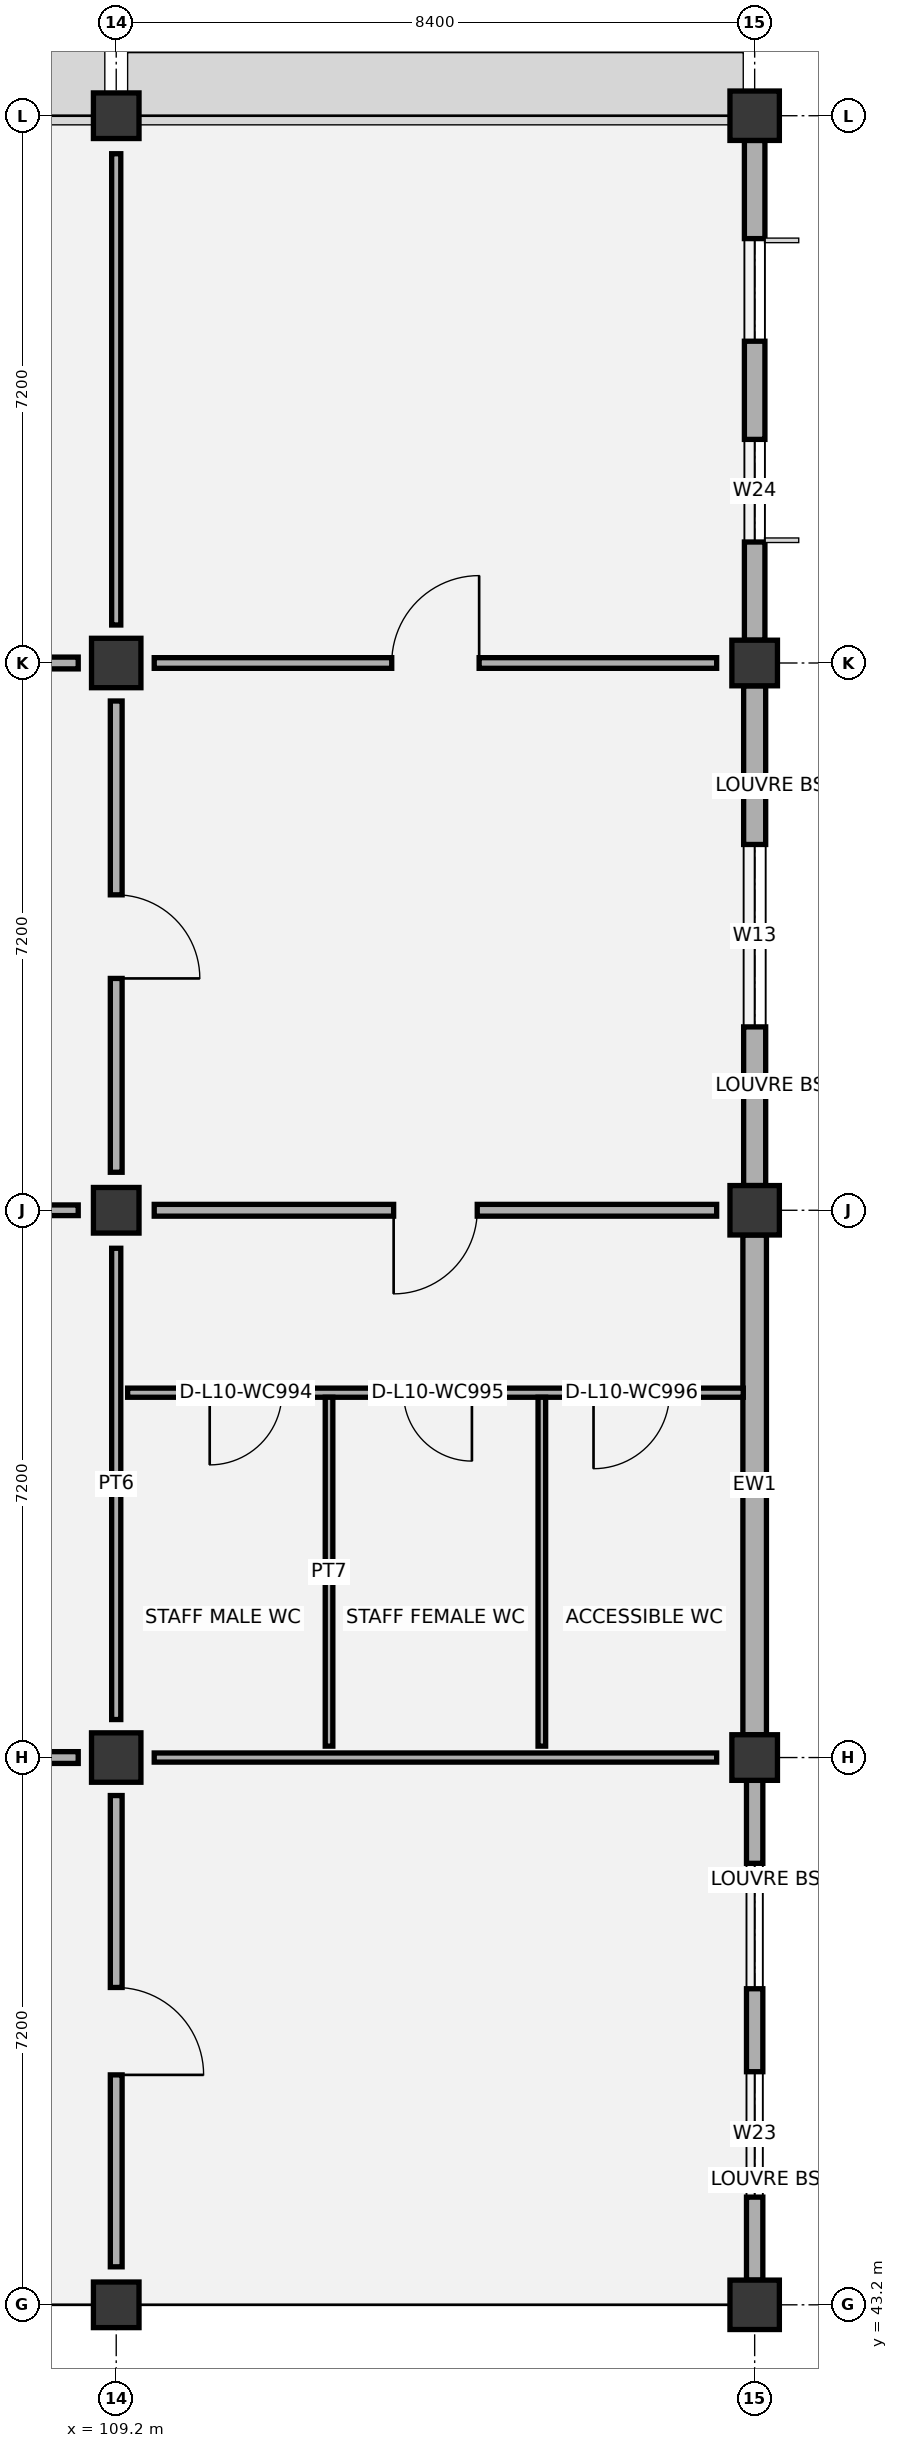
"""IFC4 building model, lengths in metres.
Left out: names, types, materials, properties, quantities, classifications, styles, units other than length and angle.
Written with IfcOpenShell. Run it as: python <this file> out.ifc"""

import sys

from ifc_helpers import new_model, si_unit, direction, frame, frame_2d, origin, origin_2d, place, context, subcontext, project, spatial, rectangle, extrude, element, fill, save


model = new_model("IFC4")
c1 = context("Model", 3, precision=1e-05, world=origin(), true_north=direction((0.0, 1.0)))
c2 = subcontext(c1, "Body", "Model", "MODEL_VIEW")
j1 = project(units=[si_unit("LENGTHUNIT", "METRE"), si_unit("PLANEANGLEUNIT", "RADIAN")], contexts=[c1])
p1 = place(None, origin())
s1 = spatial("IfcSite", under=j1, at=p1, CompositionType="ELEMENT")
p2 = place(p1, origin())
s2 = spatial("IfcBuilding", under=s1, at=p2, CompositionType="ELEMENT")
p3 = place(p2, frame((0.0, 0.0, 48.0)))
s3 = spatial("IfcBuildingStorey", under=s2, at=p3, CompositionType="ELEMENT", Elevation=48.0)
p4 = place(p3, frame((109.2, 43.2, 0.0), z_axis=(0.0, 0.0, 1.0), x_axis=(1.0, 0.0, 0.0)))
e1 = element("IfcColumn", 1, at=p4, inside=s3, PredefinedType="COLUMN", context=c2, shape_type="SweptSolid", body=[
    extrude(rectangle(XDim=0.6, YDim=0.6, at=origin_2d()), origin(), (0.0, 0.0, 1.0), 4.2),
])
p5 = place(p3, frame((109.2, 50.4, 0.0), z_axis=(0.0, 0.0, 1.0), x_axis=(1.0, 0.0, 0.0)))
e2 = element("IfcColumn", 2, at=p5, inside=s3, PredefinedType="COLUMN", context=c2, shape_type="SweptSolid", body=[
    extrude(rectangle(XDim=0.65, YDim=0.65, at=origin_2d()), origin(), (0.0, 0.0, 1.0), 4.2),
])
p6 = place(p3, frame((109.2, 57.6, 0.0), z_axis=(0.0, 0.0, 1.0), x_axis=(1.0, 0.0, 0.0)))
e3 = element("IfcColumn", 3, at=p6, inside=s3, PredefinedType="COLUMN", context=c2, shape_type="SweptSolid", body=[
    extrude(rectangle(XDim=0.6, YDim=0.6, at=origin_2d()), origin(), (0.0, 0.0, 1.0), 4.2),
])
p7 = place(p3, frame((109.2, 64.8, 0.0), z_axis=(0.0, 0.0, 1.0), x_axis=(1.0, 0.0, 0.0)))
e4 = element("IfcColumn", 4, at=p7, inside=s3, PredefinedType="COLUMN", context=c2, shape_type="SweptSolid", body=[
    extrude(rectangle(XDim=0.65, YDim=0.65, at=origin_2d()), origin(), (0.0, 0.0, 1.0), 4.2),
])
p8 = place(p3, frame((109.2, 72.0, 0.0), z_axis=(0.0, 0.0, 1.0), x_axis=(1.0, 0.0, 0.0)))
e5 = element("IfcColumn", 5, at=p8, inside=s3, PredefinedType="COLUMN", context=c2, shape_type="SweptSolid", body=[
    extrude(rectangle(XDim=0.6, YDim=0.6, at=origin_2d()), origin(), (0.0, 0.0, 1.0), 4.2),
])
p9 = place(p3, frame((117.6, 43.2, 0.0), z_axis=(0.0, 0.0, 1.0), x_axis=(1.0, 0.0, 0.0)))
e6 = element("IfcColumn", 6, at=p9, inside=s3, PredefinedType="COLUMN", context=c2, shape_type="SweptSolid", body=[
    extrude(rectangle(XDim=0.65, YDim=0.65, at=origin_2d()), origin(), (0.0, 0.0, 1.0), 4.2),
])
p10 = place(p3, frame((117.6, 50.4, 0.0), z_axis=(0.0, 0.0, 1.0), x_axis=(1.0, 0.0, 0.0)))
e7 = element("IfcColumn", 7, at=p10, inside=s3, PredefinedType="COLUMN", context=c2, shape_type="SweptSolid", body=[
    extrude(rectangle(XDim=0.6, YDim=0.6, at=origin_2d()), origin(), (0.0, 0.0, 1.0), 4.2),
])
p11 = place(p3, frame((117.6, 57.6, 0.0), z_axis=(0.0, 0.0, 1.0), x_axis=(1.0, 0.0, 0.0)))
e8 = element("IfcColumn", 8, at=p11, inside=s3, PredefinedType="COLUMN", context=c2, shape_type="SweptSolid", body=[
    extrude(rectangle(XDim=0.65, YDim=0.65, at=origin_2d()), origin(), (0.0, 0.0, 1.0), 4.2),
])
p12 = place(p3, frame((117.6, 64.8, 0.0), z_axis=(0.0, 0.0, 1.0), x_axis=(1.0, 0.0, 0.0)))
e9 = element("IfcColumn", 9, at=p12, inside=s3, PredefinedType="COLUMN", context=c2, shape_type="SweptSolid", body=[
    extrude(rectangle(XDim=0.6, YDim=0.6, at=origin_2d()), origin(), (0.0, 0.0, 1.0), 4.2),
])
p13 = place(p3, frame((117.6, 72.0, 0.0), z_axis=(0.0, 0.0, 1.0), x_axis=(1.0, 0.0, 0.0)))
e10 = element("IfcColumn", 10, at=p13, inside=s3, PredefinedType="COLUMN", context=c2, shape_type="SweptSolid", body=[
    extrude(rectangle(XDim=0.65, YDim=0.65, at=origin_2d()), origin(), (0.0, 0.0, 1.0), 4.2),
])
p14 = place(p3, frame((117.6, 43.525, 0.0), z_axis=(0.0, 0.0, 1.0), x_axis=(0.0, 1.0, 0.0)))
e11 = element("IfcWall", 11, at=p14, inside=s3, PredefinedType="SOLIDWALL", context=c2, shape_type="SweptSolid", body=[
    extrude(rectangle(XDim=6.575, YDim=0.215, at=frame_2d((3.288, 0.0))), origin(), (0.0, 0.0, 1.0), 3.365),
])
p15 = place(p14, frame((1.092, 0.0, 0.95)))
e12 = element("IfcOpeningElement", 12, at=p15, cuts=e11, PredefinedType="OPENING", context=c2, shape_type="SweptSolid", body=[
    extrude(rectangle(XDim=1.65, YDim=1.65, at=frame_2d((0.825, 0.825))), frame((0.0, 0.117, 0.0), z_axis=(0.0, -1.0, 0.0), x_axis=(1.0, 0.0, 0.0)), (0.0, 0.0, 1.0), 0.235),
])
p16 = place(p14, frame((3.833, 0.0, 0.95)))
e13 = element("IfcOpeningElement", 13, at=p16, cuts=e11, PredefinedType="OPENING", context=c2, shape_type="SweptSolid", body=[
    extrude(rectangle(XDim=1.65, YDim=1.65, at=frame_2d((0.825, 0.825))), frame((0.0, 0.117, 0.0), z_axis=(0.0, -1.0, 0.0), x_axis=(1.0, 0.0, 0.0)), (0.0, 0.0, 1.0), 0.235),
])
p17 = place(p3, frame((117.6, 50.7, 0.0), z_axis=(0.0, 0.0, 1.0), x_axis=(0.0, 1.0, 0.0)))
e14 = element("IfcWall", 14, at=p17, inside=s3, PredefinedType="SOLIDWALL", context=c2, shape_type="SweptSolid", body=[
    extrude(rectangle(XDim=6.575, YDim=0.31, at=frame_2d((3.288, 0.0))), origin(), (0.0, 0.0, 1.0), 3.365),
])
p18 = place(p3, frame((117.6, 57.925, 0.0), z_axis=(0.0, 0.0, 1.0), x_axis=(0.0, 1.0, 0.0)))
e15 = element("IfcWall", 15, at=p18, inside=s3, PredefinedType="SOLIDWALL", context=c2, shape_type="SweptSolid", body=[
    extrude(rectangle(XDim=6.575, YDim=0.29, at=frame_2d((3.288, 0.0))), origin(), (0.0, 0.0, 1.0), 3.365),
])
p19 = place(p18, frame((2.087, 0.0, 0.95)))
e16 = element("IfcOpeningElement", 16, at=p19, cuts=e15, PredefinedType="OPENING", context=c2, shape_type="SweptSolid", body=[
    extrude(rectangle(XDim=2.4, YDim=1.5, at=frame_2d((1.2, 0.75))), frame((0.0, 0.155, 0.0), z_axis=(0.0, -1.0, 0.0), x_axis=(1.0, 0.0, 0.0)), (0.0, 0.0, 1.0), 0.31),
])
p20 = place(p3, frame((117.6, 65.1, 0.0), z_axis=(0.0, 0.0, 1.0), x_axis=(0.0, 1.0, 0.0)))
e17 = element("IfcWall", 17, at=p20, inside=s3, PredefinedType="SOLIDWALL", context=c2, shape_type="SweptSolid", body=[
    extrude(rectangle(XDim=6.575, YDim=0.27, at=frame_2d((3.288, 0.0))), origin(), (0.0, 0.0, 1.0), 3.445),
])
p21 = place(p20, frame((1.292, 0.0, 0.95)))
e18 = element("IfcOpeningElement", 18, at=p21, cuts=e17, PredefinedType="OPENING", context=c2, shape_type="SweptSolid", body=[
    extrude(rectangle(XDim=1.35, YDim=1.65, at=frame_2d((0.675, 0.825))), frame((0.0, 0.145, 0.0), z_axis=(0.0, -1.0, 0.0), x_axis=(1.0, 0.0, 0.0)), (0.0, 0.0, 1.0), 0.29),
])
p22 = place(p20, frame((3.933, 0.0, 0.95)))
e19 = element("IfcOpeningElement", 19, at=p22, cuts=e17, PredefinedType="OPENING", context=c2, shape_type="SweptSolid", body=[
    extrude(rectangle(XDim=1.35, YDim=1.65, at=frame_2d((0.675, 0.825))), frame((0.0, 0.145, 0.0), z_axis=(0.0, -1.0, 0.0), x_axis=(1.0, 0.0, 0.0)), (0.0, 0.0, 1.0), 0.29),
])
p23 = place(p3, frame((109.35, 55.2, 0.0), z_axis=(0.0, 0.0, 1.0), x_axis=(1.0, 0.0, 0.0)))
e20 = element("IfcWall", 20, at=p23, inside=s3, PredefinedType="PARTITIONING", context=c2, shape_type="SweptSolid", body=[
    extrude(rectangle(XDim=8.1, YDim=0.12, at=frame_2d((4.05, 0.0))), origin(), (0.0, 0.0, 1.0), 3.92),
])
p24 = place(p23, frame((1.08, 0.0, 0.0)))
e21 = element("IfcOpeningElement", 21, at=p24, cuts=e20, PredefinedType="OPENING", context=c2, shape_type="SweptSolid", body=[
    extrude(rectangle(XDim=0.95, YDim=2.1, at=frame_2d((0.475, 1.05))), frame((0.0, 0.07, 0.0), z_axis=(0.0, -1.0, 0.0), x_axis=(1.0, 0.0, 0.0)), (0.0, 0.0, 1.0), 0.14),
])
p25 = place(p23, frame((3.63, 0.0, 0.0)))
e22 = element("IfcOpeningElement", 22, at=p25, cuts=e20, PredefinedType="OPENING", context=c2, shape_type="SweptSolid", body=[
    extrude(rectangle(XDim=0.9, YDim=2.1, at=frame_2d((0.45, 1.05))), frame((0.0, 0.07, 0.0), z_axis=(0.0, -1.0, 0.0), x_axis=(1.0, 0.0, 0.0)), (0.0, 0.0, 1.0), 0.14),
])
p26 = place(p23, frame((6.13, 0.0, 0.0)))
e23 = element("IfcOpeningElement", 23, at=p26, cuts=e20, PredefinedType="OPENING", context=c2, shape_type="SweptSolid", body=[
    extrude(rectangle(XDim=1.0, YDim=2.1, at=frame_2d((0.5, 1.05))), frame((0.0, 0.07, 0.0), z_axis=(0.0, -1.0, 0.0), x_axis=(1.0, 0.0, 0.0)), (0.0, 0.0, 1.0), 0.14),
])
for number, where, z_axis, x_axis in (
    (24, (112.0, 50.55, 0.0), (0.0, 0.0, 1.0), (0.0, 1.0, 0.0)),
    (25, (114.8, 50.55, 0.0), (0.0, 0.0, 1.0), (0.0, 1.0, 0.0)),
):
    element("IfcWall", number, at=place(p3, frame(where, z_axis=z_axis, x_axis=x_axis)), inside=s3, PredefinedType="PARTITIONING", context=c2, shape_type="SweptSolid", body=[
        extrude(rectangle(XDim=4.59, YDim=0.1, at=frame_2d((2.295, 0.0))), origin(), (0.0, 0.0, 1.0), 3.92),
    ])
p27 = place(p3, frame((109.2, 43.7, 0.0), z_axis=(0.0, 0.0, 1.0), x_axis=(0.0, 1.0, 0.0)))
e26 = element("IfcWall", 26, at=p27, inside=s3, PredefinedType="PARTITIONING", context=c2, shape_type="SweptSolid", body=[
    extrude(rectangle(XDim=6.2, YDim=0.155, at=frame_2d((3.1, 0.0))), origin(), (0.0, 0.0, 1.0), 3.415),
])
p28 = place(p27, frame((2.525, 0.0, 0.0)))
e27 = element("IfcOpeningElement", 27, at=p28, cuts=e26, PredefinedType="OPENING", context=c2, shape_type="SweptSolid", body=[
    extrude(rectangle(XDim=1.15, YDim=2.1, at=frame_2d((0.575, 1.05))), frame((0.0, 0.087, 0.0), z_axis=(0.0, -1.0, 0.0), x_axis=(1.0, 0.0, 0.0)), (0.0, 0.0, 1.0), 0.175),
])
p29 = place(p3, frame((101.3, 50.4, 0.0), z_axis=(0.0, 0.0, 1.0), x_axis=(1.0, 0.0, 0.0)))
e28 = element("IfcWall", 28, at=p29, inside=s3, PredefinedType="PARTITIONING", context=c2, shape_type="SweptSolid", body=[
    extrude(rectangle(XDim=7.4, YDim=0.155, at=frame_2d((3.7, 0.0))), origin(), (0.0, 0.0, 1.0), 3.365),
])
p30 = place(p29, frame((3.15, 0.0, 0.0)))
e29 = element("IfcOpeningElement", 29, at=p30, cuts=e28, PredefinedType="OPENING", context=c2, shape_type="SweptSolid", body=[
    extrude(rectangle(XDim=1.1, YDim=2.1, at=frame_2d((0.55, 1.05))), frame((0.0, 0.087, 0.0), z_axis=(0.0, -1.0, 0.0), x_axis=(1.0, 0.0, 0.0)), (0.0, 0.0, 1.0), 0.175),
])
p31 = place(p3, frame((109.2, 50.9, 0.0), z_axis=(0.0, 0.0, 1.0), x_axis=(0.0, 1.0, 0.0)))
e30 = element("IfcWall", 30, at=p31, inside=s3, PredefinedType="PARTITIONING", context=c2, shape_type="SweptSolid", body=[
    extrude(rectangle(XDim=6.2, YDim=0.12, at=frame_2d((3.1, 0.0))), origin(), (0.0, 0.0, 1.0), 3.515),
])
p32 = place(p3, frame((101.3, 57.6, 0.0), z_axis=(0.0, 0.0, 1.0), x_axis=(1.0, 0.0, 0.0)))
e31 = element("IfcWall", 31, at=p32, inside=s3, PredefinedType="PARTITIONING", context=c2, shape_type="SweptSolid", body=[
    extrude(rectangle(XDim=7.4, YDim=0.14, at=frame_2d((3.7, 0.0))), origin(), (0.0, 0.0, 1.0), 3.365),
])
p33 = place(p32, frame((3.125, 0.0, 0.0)))
e32 = element("IfcOpeningElement", 32, at=p33, cuts=e31, PredefinedType="OPENING", context=c2, shape_type="SweptSolid", body=[
    extrude(rectangle(XDim=1.15, YDim=2.1, at=frame_2d((0.575, 1.05))), frame((0.0, 0.08, 0.0), z_axis=(0.0, -1.0, 0.0), x_axis=(1.0, 0.0, 0.0)), (0.0, 0.0, 1.0), 0.16),
])
p34 = place(p3, frame((109.2, 58.1, 0.0), z_axis=(0.0, 0.0, 1.0), x_axis=(0.0, 1.0, 0.0)))
e33 = element("IfcWall", 33, at=p34, inside=s3, PredefinedType="PARTITIONING", context=c2, shape_type="SweptSolid", body=[
    extrude(rectangle(XDim=6.2, YDim=0.155, at=frame_2d((3.1, 0.0))), origin(), (0.0, 0.0, 1.0), 3.415),
])
p35 = place(p34, frame((2.55, 0.0, 0.0)))
e34 = element("IfcOpeningElement", 34, at=p35, cuts=e33, PredefinedType="OPENING", context=c2, shape_type="SweptSolid", body=[
    extrude(rectangle(XDim=1.1, YDim=2.1, at=frame_2d((0.55, 1.05))), frame((0.0, 0.087, 0.0), z_axis=(0.0, -1.0, 0.0), x_axis=(1.0, 0.0, 0.0)), (0.0, 0.0, 1.0), 0.175),
])
p36 = place(p3, frame((101.3, 64.8, 0.0), z_axis=(0.0, 0.0, 1.0), x_axis=(1.0, 0.0, 0.0)))
e35 = element("IfcWall", 35, at=p36, inside=s3, PredefinedType="PARTITIONING", context=c2, shape_type="SweptSolid", body=[
    extrude(rectangle(XDim=7.4, YDim=0.155, at=frame_2d((3.7, 0.0))), origin(), (0.0, 0.0, 1.0), 3.365),
])
p37 = place(p36, frame((3.125, 0.0, 0.0)))
e36 = element("IfcOpeningElement", 36, at=p37, cuts=e35, PredefinedType="OPENING", context=c2, shape_type="SweptSolid", body=[
    extrude(rectangle(XDim=1.15, YDim=2.1, at=frame_2d((0.575, 1.05))), frame((0.0, 0.087, 0.0), z_axis=(0.0, -1.0, 0.0), x_axis=(1.0, 0.0, 0.0)), (0.0, 0.0, 1.0), 0.175),
])
p38 = place(p3, frame((109.2, 65.3, 0.0), z_axis=(0.0, 0.0, 1.0), x_axis=(0.0, 1.0, 0.0)))
e37 = element("IfcWall", 37, at=p38, inside=s3, PredefinedType="PARTITIONING", context=c2, shape_type="SweptSolid", body=[
    extrude(rectangle(XDim=6.2, YDim=0.12, at=frame_2d((3.1, 0.0))), origin(), (0.0, 0.0, 1.0), 3.625),
])
p39 = place(p3, frame((109.7, 50.4, 0.0), z_axis=(0.0, 0.0, 1.0), x_axis=(1.0, 0.0, 0.0)))
e38 = element("IfcWall", 38, at=p39, inside=s3, PredefinedType="PARTITIONING", context=c2, shape_type="SweptSolid", body=[
    extrude(rectangle(XDim=7.4, YDim=0.12, at=frame_2d((3.7, 0.0))), origin(), (0.0, 0.0, 1.0), 3.365),
])
p40 = place(p3, frame((109.7, 57.6, 0.0), z_axis=(0.0, 0.0, 1.0), x_axis=(1.0, 0.0, 0.0)))
e39 = element("IfcWall", 39, at=p40, inside=s3, PredefinedType="PARTITIONING", context=c2, shape_type="SweptSolid", body=[
    extrude(rectangle(XDim=7.4, YDim=0.155, at=frame_2d((3.7, 0.0))), origin(), (0.0, 0.0, 1.0), 3.365),
])
p41 = place(p40, frame((3.15, 0.0, 0.0)))
e40 = element("IfcOpeningElement", 40, at=p41, cuts=e39, PredefinedType="OPENING", context=c2, shape_type="SweptSolid", body=[
    extrude(rectangle(XDim=1.1, YDim=2.1, at=frame_2d((0.55, 1.05))), frame((0.0, 0.087, 0.0), z_axis=(0.0, -1.0, 0.0), x_axis=(1.0, 0.0, 0.0)), (0.0, 0.0, 1.0), 0.175),
])
p42 = place(p3, frame((109.7, 64.8, 0.0), z_axis=(0.0, 0.0, 1.0), x_axis=(1.0, 0.0, 0.0)))
e41 = element("IfcWall", 41, at=p42, inside=s3, PredefinedType="PARTITIONING", context=c2, shape_type="SweptSolid", body=[
    extrude(rectangle(XDim=7.4, YDim=0.14, at=frame_2d((3.7, 0.0))), origin(), (0.0, 0.0, 1.0), 3.365),
])
p43 = place(p42, frame((3.125, 0.0, 0.0)))
e42 = element("IfcOpeningElement", 42, at=p43, cuts=e41, PredefinedType="OPENING", context=c2, shape_type="SweptSolid", body=[
    extrude(rectangle(XDim=1.15, YDim=2.1, at=frame_2d((0.575, 1.05))), frame((0.0, 0.08, 0.0), z_axis=(0.0, -1.0, 0.0), x_axis=(1.0, 0.0, 0.0)), (0.0, 0.0, 1.0), 0.16),
])
p44 = place(p15, origin())
e43 = element("IfcWindow", 43, at=p44, inside=s3, PartitioningType="SINGLE_PANEL", PredefinedType="WINDOW", context=c2, shape_type="SweptSolid", body=[
    extrude(rectangle(XDim=1.65, YDim=1.65, at=frame_2d((0.825, 0.825))), frame((0.0, 0.03, 0.0), z_axis=(0.0, -1.0, 0.0), x_axis=(1.0, 0.0, 0.0)), (0.0, 0.0, 1.0), 0.06),
])
fill(e12, e43)
p45 = place(p16, origin())
e44 = element("IfcWindow", 44, at=p45, inside=s3, PartitioningType="SINGLE_PANEL", PredefinedType="WINDOW", context=c2, shape_type="SweptSolid", body=[
    extrude(rectangle(XDim=1.65, YDim=1.65, at=frame_2d((0.825, 0.825))), frame((0.0, 0.03, 0.0), z_axis=(0.0, -1.0, 0.0), x_axis=(1.0, 0.0, 0.0)), (0.0, 0.0, 1.0), 0.06),
])
fill(e13, e44)
p46 = place(p19, origin())
e45 = element("IfcWindow", 45, at=p46, inside=s3, PartitioningType="SINGLE_PANEL", PredefinedType="WINDOW", context=c2, shape_type="SweptSolid", body=[
    extrude(rectangle(XDim=2.4, YDim=1.5, at=frame_2d((1.2, 0.75))), frame((0.0, 0.03, 0.0), z_axis=(0.0, -1.0, 0.0), x_axis=(1.0, 0.0, 0.0)), (0.0, 0.0, 1.0), 0.06),
])
fill(e16, e45)
p47 = place(p21, origin())
e46 = element("IfcWindow", 46, at=p47, inside=s3, PartitioningType="SINGLE_PANEL", PredefinedType="WINDOW", context=c2, shape_type="SweptSolid", body=[
    extrude(rectangle(XDim=1.35, YDim=1.65, at=frame_2d((0.675, 0.825))), frame((0.0, 0.03, 0.0), z_axis=(0.0, -1.0, 0.0), x_axis=(1.0, 0.0, 0.0)), (0.0, 0.0, 1.0), 0.06),
])
fill(e18, e46)
p48 = place(p22, origin())
e47 = element("IfcWindow", 47, at=p48, inside=s3, PartitioningType="SINGLE_PANEL", PredefinedType="WINDOW", context=c2, shape_type="SweptSolid", body=[
    extrude(rectangle(XDim=1.35, YDim=1.65, at=frame_2d((0.675, 0.825))), frame((0.0, 0.03, 0.0), z_axis=(0.0, -1.0, 0.0), x_axis=(1.0, 0.0, 0.0)), (0.0, 0.0, 1.0), 0.06),
])
fill(e19, e47)
p49 = place(p24, frame((0.95, 0.0, 0.0), z_axis=(0.0, 0.0, 1.0), x_axis=(-1.0, 0.0, 0.0)))
e48 = element("IfcDoor", 48, at=p49, inside=s3, OperationType="SINGLE_SWING_RIGHT", PredefinedType="DOOR", context=c2, shape_type="SweptSolid", body=[
    extrude(rectangle(XDim=0.95, YDim=2.1, at=frame_2d((0.475, 1.05))), frame((0.0, 0.025, 0.0), z_axis=(0.0, -1.0, 0.0), x_axis=(1.0, 0.0, 0.0)), (0.0, 0.0, 1.0), 0.05),
])
fill(e21, e48)
p50 = place(p25, frame((0.9, 0.0, 0.0), z_axis=(0.0, 0.0, 1.0), x_axis=(-1.0, 0.0, 0.0)))
e49 = element("IfcDoor", 49, at=p50, inside=s3, OperationType="SINGLE_SWING_LEFT", PredefinedType="DOOR", context=c2, shape_type="SweptSolid", body=[
    extrude(rectangle(XDim=0.9, YDim=2.1, at=frame_2d((0.45, 1.05))), frame((0.0, 0.025, 0.0), z_axis=(0.0, -1.0, 0.0), x_axis=(1.0, 0.0, 0.0)), (0.0, 0.0, 1.0), 0.05),
])
fill(e22, e49)
p51 = place(p26, frame((1.0, 0.0, 0.0), z_axis=(0.0, 0.0, 1.0), x_axis=(-1.0, 0.0, 0.0)))
e50 = element("IfcDoor", 50, at=p51, inside=s3, OperationType="SINGLE_SWING_RIGHT", PredefinedType="DOOR", context=c2, shape_type="SweptSolid", body=[
    extrude(rectangle(XDim=1.0, YDim=2.1, at=frame_2d((0.5, 1.05))), frame((0.0, 0.025, 0.0), z_axis=(0.0, -1.0, 0.0), x_axis=(1.0, 0.0, 0.0)), (0.0, 0.0, 1.0), 0.05),
])
fill(e23, e50)
p52 = place(p28, frame((1.15, 0.0, 0.0), z_axis=(0.0, 0.0, 1.0), x_axis=(-1.0, 0.0, 0.0)))
e51 = element("IfcDoor", 51, at=p52, inside=s3, OperationType="SINGLE_SWING_RIGHT", PredefinedType="DOOR", context=c2, shape_type="SweptSolid", body=[
    extrude(rectangle(XDim=1.15, YDim=2.1, at=frame_2d((0.575, 1.05))), frame((0.0, 0.025, 0.0), z_axis=(0.0, -1.0, 0.0), x_axis=(1.0, 0.0, 0.0)), (0.0, 0.0, 1.0), 0.05),
])
fill(e27, e51)
p53 = place(p35, frame((1.1, 0.0, 0.0), z_axis=(0.0, 0.0, 1.0), x_axis=(-1.0, 0.0, 0.0)))
e52 = element("IfcDoor", 52, at=p53, inside=s3, OperationType="SINGLE_SWING_RIGHT", PredefinedType="DOOR", context=c2, shape_type="SweptSolid", body=[
    extrude(rectangle(XDim=1.1, YDim=2.1, at=frame_2d((0.55, 1.05))), frame((0.0, 0.025, 0.0), z_axis=(0.0, -1.0, 0.0), x_axis=(1.0, 0.0, 0.0)), (0.0, 0.0, 1.0), 0.05),
])
fill(e34, e52)
p54 = place(p41, frame((1.1, 0.0, 0.0), z_axis=(0.0, 0.0, 1.0), x_axis=(-1.0, 0.0, 0.0)))
e53 = element("IfcDoor", 53, at=p54, inside=s3, OperationType="SINGLE_SWING_RIGHT", PredefinedType="DOOR", context=c2, shape_type="SweptSolid", body=[
    extrude(rectangle(XDim=1.1, YDim=2.1, at=frame_2d((0.55, 1.05))), frame((0.0, 0.025, 0.0), z_axis=(0.0, -1.0, 0.0), x_axis=(1.0, 0.0, 0.0)), (0.0, 0.0, 1.0), 0.05),
])
fill(e40, e53)
p55 = place(p43, origin())
e54 = element("IfcDoor", 54, at=p55, inside=s3, OperationType="SINGLE_SWING_RIGHT", PredefinedType="DOOR", context=c2, shape_type="SweptSolid", body=[
    extrude(rectangle(XDim=1.15, YDim=2.1, at=frame_2d((0.575, 1.05))), frame((0.0, 0.025, 0.0), z_axis=(0.0, -1.0, 0.0), x_axis=(1.0, 0.0, 0.0)), (0.0, 0.0, 1.0), 0.05),
])
fill(e42, e54)
save(model, sys.argv[1])
